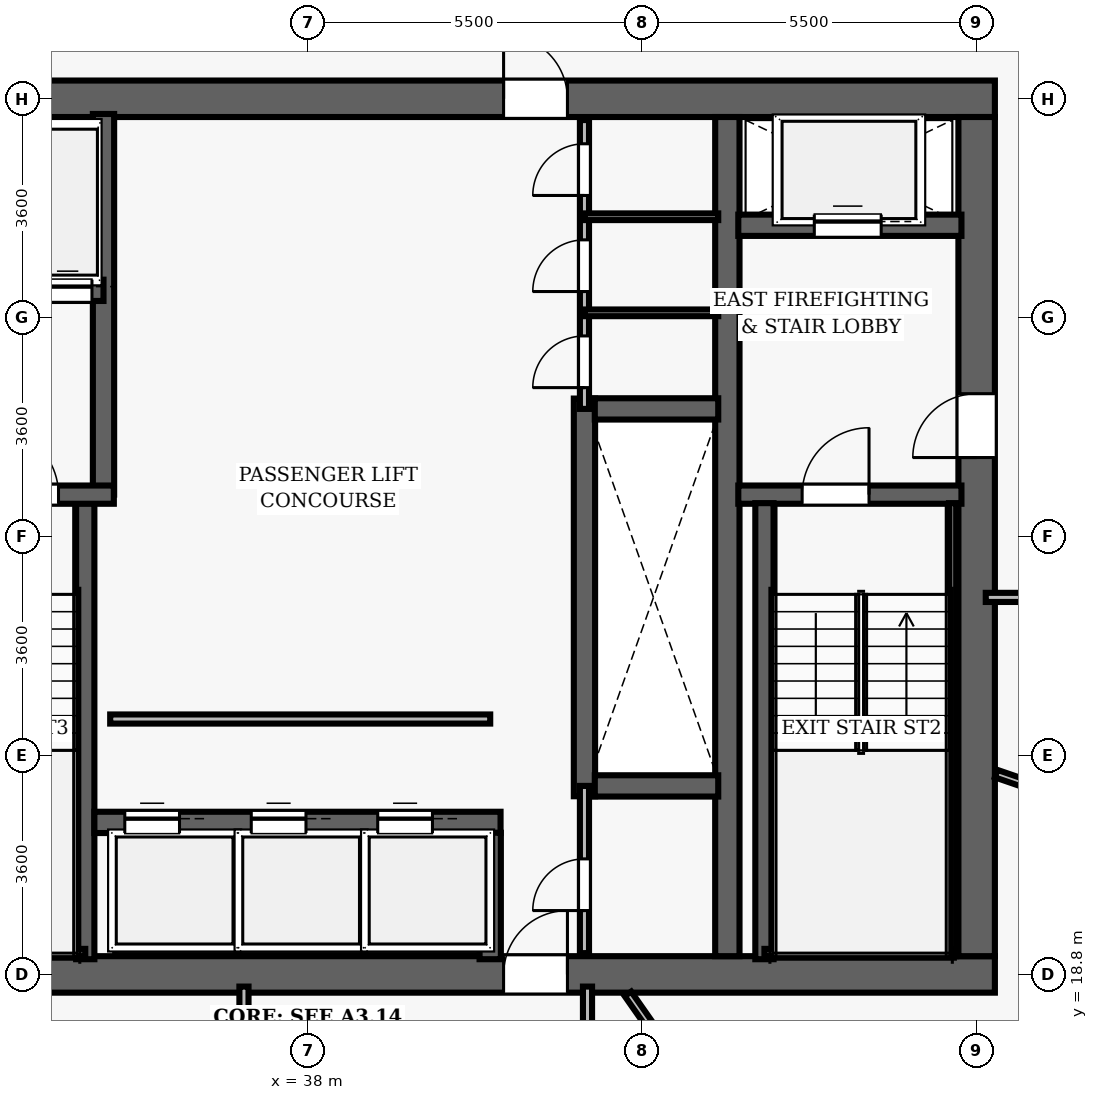
"""IFC4 building model, lengths in metres.
Left out: names, types, materials, properties, quantities, classifications, styles, units other than length and angle.
Written with IfcOpenShell. Run it as: python <this file> out.ifc"""

import sys

from ifc_helpers import new_model, si_unit, direction, frame, frame_2d, origin, place, context, subcontext, project, spatial, rectangle, extrude, element, fill, save


model = new_model("IFC4")
c1 = context("Model", 3, precision=1e-05, world=origin(), true_north=direction((0.0, 1.0)))
c2 = subcontext(c1, "Body", "Model", "MODEL_VIEW")
j1 = project(units=[si_unit("LENGTHUNIT", "METRE"), si_unit("PLANEANGLEUNIT", "RADIAN")], contexts=[c1])
p1 = place(None, origin())
s1 = spatial("IfcSite", under=j1, at=p1, CompositionType="ELEMENT")
p2 = place(p1, origin())
s2 = spatial("IfcBuilding", under=s1, at=p2, CompositionType="ELEMENT")
p3 = place(p2, frame((0.0, 0.0, 162.3)))
s3 = spatial("IfcBuildingStorey", under=s2, at=p3, CompositionType="ELEMENT", Elevation=162.3)
p4 = place(p3, frame((26.7, 18.8, 0.0), z_axis=(0.0, 0.0, 1.0), x_axis=(1.0, 0.0, 0.0)))
e1 = element("IfcWall", 1, at=p4, inside=s3, PredefinedType="SHEAR", context=c2, shape_type="SweptSolid", body=[
    extrude(rectangle(XDim=22.6, YDim=0.6, at=frame_2d((11.3, 0.0))), origin(), (0.0, 0.0, 1.0), 3.5),
])
p5 = place(p4, frame((14.52, 0.0, 0.0)))
e2 = element("IfcOpeningElement", 2, at=p5, cuts=e1, PredefinedType="OPENING", context=c2, shape_type="SweptSolid", body=[
    extrude(rectangle(XDim=1.05, YDim=2.15, at=frame_2d((0.525, 1.075))), frame((0.0, 0.31, 0.0), z_axis=(0.0, -1.0, 0.0), x_axis=(1.0, 0.0, 0.0)), (0.0, 0.0, 1.0), 0.62),
])
p6 = place(p3, frame((26.7, 33.2, 0.0), z_axis=(0.0, 0.0, 1.0), x_axis=(1.0, 0.0, 0.0)))
e3 = element("IfcWall", 3, at=p6, inside=s3, PredefinedType="SHEAR", context=c2, shape_type="SweptSolid", body=[
    extrude(rectangle(XDim=22.6, YDim=0.6, at=frame_2d((11.3, 0.0))), origin(), (0.0, 0.0, 1.0), 3.5),
])
p7 = place(p6, frame((4.62, 0.0, 0.0)))
e4 = element("IfcOpeningElement", 4, at=p7, cuts=e3, PredefinedType="OPENING", context=c2, shape_type="SweptSolid", body=[
    extrude(rectangle(XDim=1.05, YDim=2.15, at=frame_2d((0.525, 1.075))), frame((0.0, 0.31, 0.0), z_axis=(0.0, -1.0, 0.0), x_axis=(1.0, 0.0, 0.0)), (0.0, 0.0, 1.0), 0.62),
])
p8 = place(p6, frame((14.52, 0.0, 0.0)))
e5 = element("IfcOpeningElement", 5, at=p8, cuts=e3, PredefinedType="OPENING", context=c2, shape_type="SweptSolid", body=[
    extrude(rectangle(XDim=1.05, YDim=2.15, at=frame_2d((0.525, 1.075))), frame((0.0, 0.31, 0.0), z_axis=(0.0, -1.0, 0.0), x_axis=(1.0, 0.0, 0.0)), (0.0, 0.0, 1.0), 0.62),
])
p9 = place(p3, frame((49.0, 19.1, 0.0), z_axis=(0.0, 0.0, 1.0), x_axis=(0.0, 1.0, 0.0)))
e6 = element("IfcWall", 6, at=p9, inside=s3, PredefinedType="SHEAR", context=c2, shape_type="SweptSolid", body=[
    extrude(rectangle(XDim=13.8, YDim=0.6, at=frame_2d((6.9, 0.0))), origin(), (0.0, 0.0, 1.0), 3.5),
])
p10 = place(p9, frame((8.2, 0.0, 0.0)))
e7 = element("IfcOpeningElement", 7, at=p10, cuts=e6, PredefinedType="OPENING", context=c2, shape_type="SweptSolid", body=[
    extrude(rectangle(XDim=1.05, YDim=2.15, at=frame_2d((0.525, 1.075))), frame((0.0, 0.31, 0.0), z_axis=(0.0, -1.0, 0.0), x_axis=(1.0, 0.0, 0.0)), (0.0, 0.0, 1.0), 0.62),
])
p11 = place(p3, frame((44.9, 19.1, 0.0), z_axis=(0.0, 0.0, 1.0), x_axis=(0.0, 1.0, 0.0)))
e8 = element("IfcWall", 8, at=p11, inside=s3, PredefinedType="SHEAR", context=c2, shape_type="SweptSolid", body=[
    extrude(rectangle(XDim=13.8, YDim=0.4, at=frame_2d((6.9, 0.0))), origin(), (0.0, 0.0, 1.0), 3.5),
])
p12 = place(p3, frame((45.08, 26.69, 0.0), z_axis=(0.0, 0.0, 1.0), x_axis=(1.0, 0.0, 0.0)))
e9 = element("IfcWall", 9, at=p12, inside=s3, PredefinedType="SHEAR", context=c2, shape_type="SweptSolid", body=[
    extrude(rectangle(XDim=3.67, YDim=0.3, at=frame_2d((1.835, 0.0))), origin(), (0.0, 0.0, 1.0), 3.5),
])
p13 = place(p12, frame((1.05, 0.0, 0.0)))
e10 = element("IfcOpeningElement", 10, at=p13, cuts=e9, PredefinedType="OPENING", context=c2, shape_type="SweptSolid", body=[
    extrude(rectangle(XDim=1.1, YDim=2.15, at=frame_2d((0.55, 1.075))), frame((0.0, 0.16, 0.0), z_axis=(0.0, -1.0, 0.0), x_axis=(1.0, 0.0, 0.0)), (0.0, 0.0, 1.0), 0.32),
])
p14 = place(p3, frame((45.51, 19.05, 0.0), z_axis=(0.0, 0.0, 1.0), x_axis=(0.0, 1.0, 0.0)))
e11 = element("IfcWall", 11, at=p14, inside=s3, PredefinedType="SHEAR", context=c2, shape_type="SweptSolid", body=[
    extrude(rectangle(XDim=7.5, YDim=0.3, at=frame_2d((3.75, 0.0))), origin(), (0.0, 0.0, 1.0), 3.5),
])
p15 = place(p3, frame((48.605, 19.1, 0.0), z_axis=(0.0, 0.0, 1.0), x_axis=(0.0, 1.0, 0.0)))
e12 = element("IfcWall", 12, at=p15, inside=s3, PredefinedType="SHEAR", context=c2, shape_type="SweptSolid", body=[
    extrude(rectangle(XDim=7.45, YDim=0.12, at=frame_2d((3.725, 0.0))), origin(), (0.0, 0.0, 1.0), 3.5),
])
p16 = place(p3, frame((45.51, 19.16, 0.0), z_axis=(0.0, 0.0, 1.0), x_axis=(1.0, 0.0, 0.0)))
e13 = element("IfcWall", 13, at=p16, inside=s3, PredefinedType="SHEAR", context=c2, shape_type="SweptSolid", body=[
    extrude(rectangle(XDim=3.095, YDim=0.12, at=frame_2d((1.547, 0.0))), origin(), (0.0, 0.0, 1.0), 3.5),
])
p17 = place(p3, frame((45.08, 31.12, 0.0), z_axis=(0.0, 0.0, 1.0), x_axis=(1.0, 0.0, 0.0)))
e14 = element("IfcWall", 14, at=p17, inside=s3, PredefinedType="SHEAR", context=c2, shape_type="SweptSolid", body=[
    extrude(rectangle(XDim=3.67, YDim=0.35, at=frame_2d((1.835, 0.0))), origin(), (0.0, 0.0, 1.0), 2.565),
])
p18 = place(p17, frame((1.25, 0.0, 0.0)))
e15 = element("IfcOpeningElement", 15, at=p18, cuts=e14, PredefinedType="OPENING", context=c2, shape_type="SweptSolid", body=[
    extrude(rectangle(XDim=1.1, YDim=2.15, at=frame_2d((0.55, 1.075))), frame((0.0, 0.185, 0.0), z_axis=(0.0, -1.0, 0.0), x_axis=(1.0, 0.0, 0.0)), (0.0, 0.0, 1.0), 0.37),
])
p19 = place(p3, frame((34.34, 19.05, 0.0), z_axis=(0.0, 0.0, 1.0), x_axis=(0.0, 1.0, 0.0)))
e16 = element("IfcWall", 16, at=p19, inside=s3, PredefinedType="SHEAR", context=c2, shape_type="SweptSolid", body=[
    extrude(rectangle(XDim=7.5, YDim=0.3, at=frame_2d((3.75, 0.0))), origin(), (0.0, 0.0, 1.0), 3.5),
])
p20 = place(p3, frame((34.64, 26.69, 0.0), z_axis=(0.0, 0.0, 1.0), x_axis=(0.0, 1.0, 0.0)))
e17 = element("IfcWall", 17, at=p20, inside=s3, PredefinedType="SHEAR", context=c2, shape_type="SweptSolid", body=[
    extrude(rectangle(XDim=6.26, YDim=0.35, at=frame_2d((3.13, 0.0))), origin(), (0.0, 0.0, 1.0), 3.5),
])
p21 = place(p3, frame((31.25, 26.69, 0.0), z_axis=(0.0, 0.0, 1.0), x_axis=(1.0, 0.0, 0.0)))
e18 = element("IfcWall", 18, at=p21, inside=s3, PredefinedType="SHEAR", context=c2, shape_type="SweptSolid", body=[
    extrude(rectangle(XDim=3.56, YDim=0.3, at=frame_2d((1.78, 0.0))), origin(), (0.0, 0.0, 1.0), 3.5),
])
p22 = place(p21, frame((1.55, 0.0, 0.0)))
e19 = element("IfcOpeningElement", 19, at=p22, cuts=e18, PredefinedType="OPENING", context=c2, shape_type="SweptSolid", body=[
    extrude(rectangle(XDim=1.1, YDim=2.15, at=frame_2d((0.55, 1.075))), frame((0.0, 0.16, 0.0), z_axis=(0.0, -1.0, 0.0), x_axis=(1.0, 0.0, 0.0)), (0.0, 0.0, 1.0), 0.32),
])
p23 = place(p3, frame((31.3, 19.16, 0.0), z_axis=(0.0, 0.0, 1.0), x_axis=(1.0, 0.0, 0.0)))
e20 = element("IfcWall", 20, at=p23, inside=s3, PredefinedType="SHEAR", context=c2, shape_type="SweptSolid", body=[
    extrude(rectangle(XDim=3.04, YDim=0.12, at=frame_2d((1.52, 0.0))), origin(), (0.0, 0.0, 1.0), 3.5),
])
p24 = place(p3, frame((32.23, 30.05, 0.0), z_axis=(0.0, 0.0, 1.0), x_axis=(1.0, 0.0, 0.0)))
e21 = element("IfcWall", 21, at=p24, inside=s3, PredefinedType="SHEAR", context=c2, shape_type="SweptSolid", body=[
    extrude(rectangle(XDim=2.41, YDim=0.35, at=frame_2d((1.205, 0.0))), origin(), (0.0, 0.0, 1.0), 2.565),
])
p25 = place(p24, frame((0.42, 0.0, 0.0)))
e22 = element("IfcOpeningElement", 22, at=p25, cuts=e21, PredefinedType="OPENING", context=c2, shape_type="SweptSolid", body=[
    extrude(rectangle(XDim=0.8, YDim=2.15, at=frame_2d((0.4, 1.075))), frame((0.0, 0.185, 0.0), z_axis=(0.0, -1.0, 0.0), x_axis=(1.0, 0.0, 0.0)), (0.0, 0.0, 1.0), 0.37),
])
p26 = place(p24, frame((1.42, 0.0, 0.0)))
e23 = element("IfcOpeningElement", 23, at=p26, cuts=e21, PredefinedType="OPENING", context=c2, shape_type="SweptSolid", body=[
    extrude(rectangle(XDim=0.8, YDim=2.15, at=frame_2d((0.4, 1.075))), frame((0.0, 0.185, 0.0), z_axis=(0.0, -1.0, 0.0), x_axis=(1.0, 0.0, 0.0)), (0.0, 0.0, 1.0), 0.37),
])
p27 = place(p3, frame((42.55, 21.73, 0.0), z_axis=(0.0, 0.0, 1.0), x_axis=(0.0, 1.0, 0.0)))
e24 = element("IfcWall", 24, at=p27, inside=s3, PredefinedType="SHEAR", context=c2, shape_type="SweptSolid", body=[
    extrude(rectangle(XDim=6.54, YDim=0.35, at=frame_2d((3.27, 0.0))), origin(), (0.0, 0.0, 1.0), 2.565),
])
for number, where, z_axis, x_axis in (
    (25, (42.72, 21.9, 0.0), (0.0, 0.0, 1.0), (1.0, 0.0, 0.0)),
    (26, (42.72, 28.1, 0.0), (0.0, 0.0, 1.0), (1.0, 0.0, 0.0)),
):
    element("IfcWall", number, at=place(p3, frame(where, z_axis=z_axis, x_axis=x_axis)), inside=s3, PredefinedType="SHEAR", context=c2, shape_type="SweptSolid", body=[
        extrude(rectangle(XDim=2.03, YDim=0.35, at=frame_2d((1.015, 0.0))), origin(), (0.0, 0.0, 1.0), 2.565),
    ])
p28 = place(p3, frame((34.49, 21.3, 0.0), z_axis=(0.0, 0.0, 1.0), x_axis=(1.0, 0.0, 0.0)))
e27 = element("IfcWall", 27, at=p28, inside=s3, PredefinedType="SHEAR", context=c2, shape_type="SweptSolid", body=[
    extrude(rectangle(XDim=6.68, YDim=0.35, at=frame_2d((3.34, 0.0))), origin(), (0.0, 0.0, 1.0), 2.565),
])
p29 = place(p28, frame((0.5, 0.0, 0.0)))
e28 = element("IfcOpeningElement", 28, at=p29, cuts=e27, PredefinedType="OPENING", context=c2, shape_type="SweptSolid", body=[
    extrude(rectangle(XDim=0.9, YDim=2.15, at=frame_2d((0.45, 1.075))), frame((0.0, 0.185, 0.0), z_axis=(0.0, -1.0, 0.0), x_axis=(1.0, 0.0, 0.0)), (0.0, 0.0, 1.0), 0.37),
])
p30 = place(p28, frame((2.58, 0.0, 0.0)))
e29 = element("IfcOpeningElement", 29, at=p30, cuts=e27, PredefinedType="OPENING", context=c2, shape_type="SweptSolid", body=[
    extrude(rectangle(XDim=0.9, YDim=2.15, at=frame_2d((0.45, 1.075))), frame((0.0, 0.185, 0.0), z_axis=(0.0, -1.0, 0.0), x_axis=(1.0, 0.0, 0.0)), (0.0, 0.0, 1.0), 0.37),
])
p31 = place(p28, frame((4.66, 0.0, 0.0)))
e30 = element("IfcOpeningElement", 30, at=p31, cuts=e27, PredefinedType="OPENING", context=c2, shape_type="SweptSolid", body=[
    extrude(rectangle(XDim=0.9, YDim=2.15, at=frame_2d((0.45, 1.075))), frame((0.0, 0.185, 0.0), z_axis=(0.0, -1.0, 0.0), x_axis=(1.0, 0.0, 0.0)), (0.0, 0.0, 1.0), 0.37),
])
p32 = place(p3, frame((41.0, 19.05, 0.0), z_axis=(0.0, 0.0, 1.0), x_axis=(0.0, 1.0, 0.0)))
e31 = element("IfcWall", 31, at=p32, inside=s3, PredefinedType="SHEAR", context=c2, shape_type="SweptSolid", body=[
    extrude(rectangle(XDim=2.08, YDim=0.35, at=frame_2d((1.04, 0.0))), origin(), (0.0, 0.0, 1.0), 2.565),
])
p33 = place(p3, frame((34.75, 23.0, 0.0), z_axis=(0.0, 0.0, 1.0), x_axis=(1.0, 0.0, 0.0)))
e32 = element("IfcWall", 32, at=p33, inside=s3, PredefinedType="PARTITIONING", context=c2, shape_type="SweptSolid", body=[
    extrude(rectangle(XDim=6.25, YDim=0.15, at=frame_2d((3.125, 0.0))), origin(), (0.0, 0.0, 1.0), 2.565),
])
p34 = place(p3, frame((42.55, 28.1, 0.0), z_axis=(0.0, 0.0, 1.0), x_axis=(0.0, 1.0, 0.0)))
e33 = element("IfcWall", 33, at=p34, inside=s3, PredefinedType="PARTITIONING", context=c2, shape_type="SweptSolid", body=[
    extrude(rectangle(XDim=4.75, YDim=0.15, at=frame_2d((2.375, 0.0))), origin(), (0.0, 0.0, 1.0), 2.565),
])
p35 = place(p34, frame((0.35, 0.0, 0.0)))
e34 = element("IfcOpeningElement", 34, at=p35, cuts=e33, PredefinedType="OPENING", context=c2, shape_type="SweptSolid", body=[
    extrude(rectangle(XDim=0.85, YDim=2.1, at=frame_2d((0.425, 1.05))), frame((0.0, 0.085, 0.0), z_axis=(0.0, -1.0, 0.0), x_axis=(1.0, 0.0, 0.0)), (0.0, 0.0, 1.0), 0.17),
])
p36 = place(p34, frame((1.93, 0.0, 0.0)))
e35 = element("IfcOpeningElement", 35, at=p36, cuts=e33, PredefinedType="OPENING", context=c2, shape_type="SweptSolid", body=[
    extrude(rectangle(XDim=0.85, YDim=2.1, at=frame_2d((0.425, 1.05))), frame((0.0, 0.085, 0.0), z_axis=(0.0, -1.0, 0.0), x_axis=(1.0, 0.0, 0.0)), (0.0, 0.0, 1.0), 0.17),
])
p37 = place(p34, frame((3.51, 0.0, 0.0)))
e36 = element("IfcOpeningElement", 36, at=p37, cuts=e33, PredefinedType="OPENING", context=c2, shape_type="SweptSolid", body=[
    extrude(rectangle(XDim=0.85, YDim=2.1, at=frame_2d((0.425, 1.05))), frame((0.0, 0.085, 0.0), z_axis=(0.0, -1.0, 0.0), x_axis=(1.0, 0.0, 0.0)), (0.0, 0.0, 1.0), 0.17),
])
for number, where, z_axis, x_axis in (
    (37, (42.55, 29.68, 0.0), (0.0, 0.0, 1.0), (1.0, 0.0, 0.0)),
    (38, (42.55, 31.26, 0.0), (0.0, 0.0, 1.0), (1.0, 0.0, 0.0)),
):
    element("IfcWall", number, at=place(p3, frame(where, z_axis=z_axis, x_axis=x_axis)), inside=s3, PredefinedType="PARTITIONING", context=c2, shape_type="SweptSolid", body=[
        extrude(rectangle(XDim=2.2, YDim=0.11, at=frame_2d((1.1, 0.0))), origin(), (0.0, 0.0, 1.0), 2.565),
    ])
p38 = place(p3, frame((42.55, 19.15, 0.0), z_axis=(0.0, 0.0, 1.0), x_axis=(0.0, 1.0, 0.0)))
e39 = element("IfcWall", 39, at=p38, inside=s3, PredefinedType="PARTITIONING", context=c2, shape_type="SweptSolid", body=[
    extrude(rectangle(XDim=2.75, YDim=0.15, at=frame_2d((1.375, 0.0))), origin(), (0.0, 0.0, 1.0), 2.565),
])
p39 = place(p38, frame((0.7, 0.0, 0.0)))
e40 = element("IfcOpeningElement", 40, at=p39, cuts=e39, PredefinedType="OPENING", context=c2, shape_type="SweptSolid", body=[
    extrude(rectangle(XDim=0.85, YDim=2.1, at=frame_2d((0.425, 1.05))), frame((0.0, 0.085, 0.0), z_axis=(0.0, -1.0, 0.0), x_axis=(1.0, 0.0, 0.0)), (0.0, 0.0, 1.0), 0.17),
])
p40 = place(p3, frame((49.15, 25.0, 0.0), z_axis=(0.0, 0.0, 1.0), x_axis=(1.0, 0.0, 0.0)))
e41 = element("IfcWall", 41, at=p40, inside=s3, PredefinedType="PARTITIONING", context=c2, shape_type="SweptSolid", body=[
    extrude(rectangle(XDim=11.661, YDim=0.15, at=frame_2d((5.831, 0.0))), origin(), (0.0, 0.0, 1.0), 2.565),
])
p41 = place(p40, frame((2.44, 0.0, 0.0)))
e42 = element("IfcOpeningElement", 42, at=p41, cuts=e41, PredefinedType="OPENING", context=c2, shape_type="SweptSolid", body=[
    extrude(rectangle(XDim=0.95, YDim=2.15, at=frame_2d((0.475, 1.075))), frame((0.0, 0.085, 0.0), z_axis=(0.0, -1.0, 0.0), x_axis=(1.0, 0.0, 0.0)), (0.0, 0.0, 1.0), 0.17),
])
p42 = place(p3, frame((36.95, 11.2, 0.0), z_axis=(0.0, 0.0, 1.0), x_axis=(0.0, 1.0, 0.0)))
e43 = element("IfcWall", 43, at=p42, inside=s3, PredefinedType="PARTITIONING", context=c2, shape_type="SweptSolid", body=[
    extrude(rectangle(XDim=7.4, YDim=0.15, at=frame_2d((3.7, 0.0))), origin(), (0.0, 0.0, 1.0), 2.565),
])
p43 = place(p42, frame((5.075, 0.0, 0.0)))
e44 = element("IfcOpeningElement", 44, at=p43, cuts=e43, PredefinedType="OPENING", context=c2, shape_type="SweptSolid", body=[
    extrude(rectangle(XDim=0.95, YDim=2.15, at=frame_2d((0.475, 1.075))), frame((0.0, 0.085, 0.0), z_axis=(0.0, -1.0, 0.0), x_axis=(1.0, 0.0, 0.0)), (0.0, 0.0, 1.0), 0.17),
])
p44 = place(p3, frame((42.6, 16.65, 0.0), z_axis=(0.0, 0.0, 1.0), x_axis=(0.0, 1.0, 0.0)))
e45 = element("IfcWall", 45, at=p44, inside=s3, PredefinedType="PARTITIONING", context=c2, shape_type="SweptSolid", body=[
    extrude(rectangle(XDim=1.95, YDim=0.15, at=frame_2d((0.975, 0.0))), origin(), (0.0, 0.0, 1.0), 2.565),
])
p45 = place(p3, frame((43.266, 18.48, 0.0), z_axis=(0.0, 0.0, 1.0), x_axis=(0.57357232701, -0.819154921665, 0.0)))
e46 = element("IfcWall", 46, at=p45, inside=s3, PredefinedType="PARTITIONING", context=c2, shape_type="SweptSolid", body=[
    extrude(rectangle(XDim=17.281, YDim=0.13, at=frame_2d((8.641, 0.0))), origin(), (0.0, 0.0, 1.0), 2.565),
])
p46 = place(p3, frame((49.32, 22.102, 0.0), z_axis=(0.0, 0.0, 1.0), x_axis=(0.945519103615, -0.325566620984, 0.0)))
e47 = element("IfcWall", 47, at=p46, inside=s3, PredefinedType="PARTITIONING", context=c2, shape_type="SweptSolid", body=[
    extrude(rectangle(XDim=15.331, YDim=0.13, at=frame_2d((7.666, 0.0))), origin(), (0.0, 0.0, 1.0), 2.565),
])
p47 = place(p13, origin())
e48 = element("IfcDoor", 48, at=p47, inside=s3, OperationType="SINGLE_SWING_RIGHT", PredefinedType="DOOR", context=c2, shape_type="SweptSolid", body=[
    extrude(rectangle(XDim=1.1, YDim=2.15, at=frame_2d((0.55, 1.075))), frame((0.0, 0.025, 0.0), z_axis=(0.0, -1.0, 0.0), x_axis=(1.0, 0.0, 0.0)), (0.0, 0.0, 1.0), 0.05),
])
fill(e10, e48)
p48 = place(p10, origin())
e49 = element("IfcDoor", 49, at=p48, inside=s3, OperationType="SINGLE_SWING_LEFT", PredefinedType="DOOR", context=c2, shape_type="SweptSolid", body=[
    extrude(rectangle(XDim=1.05, YDim=2.15, at=frame_2d((0.525, 1.075))), frame((0.0, 0.025, 0.0), z_axis=(0.0, -1.0, 0.0), x_axis=(1.0, 0.0, 0.0)), (0.0, 0.0, 1.0), 0.05),
])
fill(e7, e49)
p49 = place(p22, origin())
e50 = element("IfcDoor", 50, at=p49, inside=s3, OperationType="SINGLE_SWING_LEFT", PredefinedType="DOOR", context=c2, shape_type="SweptSolid", body=[
    extrude(rectangle(XDim=1.1, YDim=2.15, at=frame_2d((0.55, 1.075))), frame((0.0, 0.025, 0.0), z_axis=(0.0, -1.0, 0.0), x_axis=(1.0, 0.0, 0.0)), (0.0, 0.0, 1.0), 0.05),
])
fill(e19, e50)
p50 = place(p8, origin())
e51 = element("IfcDoor", 51, at=p50, inside=s3, OperationType="SINGLE_SWING_LEFT", PredefinedType="DOOR", context=c2, shape_type="SweptSolid", body=[
    extrude(rectangle(XDim=1.05, YDim=2.15, at=frame_2d((0.525, 1.075))), frame((0.0, 0.025, 0.0), z_axis=(0.0, -1.0, 0.0), x_axis=(1.0, 0.0, 0.0)), (0.0, 0.0, 1.0), 0.05),
])
fill(e5, e51)
p51 = place(p5, origin())
e52 = element("IfcDoor", 52, at=p51, inside=s3, OperationType="SINGLE_SWING_RIGHT", PredefinedType="DOOR", context=c2, shape_type="SweptSolid", body=[
    extrude(rectangle(XDim=1.05, YDim=2.15, at=frame_2d((0.525, 1.075))), frame((0.0, 0.025, 0.0), z_axis=(0.0, -1.0, 0.0), x_axis=(1.0, 0.0, 0.0)), (0.0, 0.0, 1.0), 0.05),
])
fill(e2, e52)
p52 = place(p35, origin())
e53 = element("IfcDoor", 53, at=p52, inside=s3, OperationType="SINGLE_SWING_LEFT", PredefinedType="DOOR", context=c2, shape_type="SweptSolid", body=[
    extrude(rectangle(XDim=0.85, YDim=2.1, at=frame_2d((0.425, 1.05))), frame((0.0, 0.025, 0.0), z_axis=(0.0, -1.0, 0.0), x_axis=(1.0, 0.0, 0.0)), (0.0, 0.0, 1.0), 0.05),
])
fill(e34, e53)
p53 = place(p36, origin())
e54 = element("IfcDoor", 54, at=p53, inside=s3, OperationType="SINGLE_SWING_LEFT", PredefinedType="DOOR", context=c2, shape_type="SweptSolid", body=[
    extrude(rectangle(XDim=0.85, YDim=2.1, at=frame_2d((0.425, 1.05))), frame((0.0, 0.025, 0.0), z_axis=(0.0, -1.0, 0.0), x_axis=(1.0, 0.0, 0.0)), (0.0, 0.0, 1.0), 0.05),
])
fill(e35, e54)
p54 = place(p37, origin())
e55 = element("IfcDoor", 55, at=p54, inside=s3, OperationType="SINGLE_SWING_LEFT", PredefinedType="DOOR", context=c2, shape_type="SweptSolid", body=[
    extrude(rectangle(XDim=0.85, YDim=2.1, at=frame_2d((0.425, 1.05))), frame((0.0, 0.025, 0.0), z_axis=(0.0, -1.0, 0.0), x_axis=(1.0, 0.0, 0.0)), (0.0, 0.0, 1.0), 0.05),
])
fill(e36, e55)
p55 = place(p39, origin())
e56 = element("IfcDoor", 56, at=p55, inside=s3, OperationType="SINGLE_SWING_LEFT", PredefinedType="DOOR", context=c2, shape_type="SweptSolid", body=[
    extrude(rectangle(XDim=0.85, YDim=2.1, at=frame_2d((0.425, 1.05))), frame((0.0, 0.025, 0.0), z_axis=(0.0, -1.0, 0.0), x_axis=(1.0, 0.0, 0.0)), (0.0, 0.0, 1.0), 0.05),
])
fill(e40, e56)
p56 = place(p29, origin())
e57 = element("IfcDoor", 57, at=p56, inside=s3, OperationType="SLIDING_TO_LEFT", PredefinedType="DOOR", context=c2, shape_type="SweptSolid", body=[
    extrude(rectangle(XDim=0.9, YDim=2.15, at=frame_2d((0.45, 1.075))), frame((0.0, 0.025, 0.0), z_axis=(0.0, -1.0, 0.0), x_axis=(1.0, 0.0, 0.0)), (0.0, 0.0, 1.0), 0.05),
])
fill(e28, e57)
p57 = place(p30, origin())
e58 = element("IfcDoor", 58, at=p57, inside=s3, OperationType="SLIDING_TO_LEFT", PredefinedType="DOOR", context=c2, shape_type="SweptSolid", body=[
    extrude(rectangle(XDim=0.9, YDim=2.15, at=frame_2d((0.45, 1.075))), frame((0.0, 0.025, 0.0), z_axis=(0.0, -1.0, 0.0), x_axis=(1.0, 0.0, 0.0)), (0.0, 0.0, 1.0), 0.05),
])
fill(e29, e58)
p58 = place(p31, origin())
e59 = element("IfcDoor", 59, at=p58, inside=s3, OperationType="SLIDING_TO_LEFT", PredefinedType="DOOR", context=c2, shape_type="SweptSolid", body=[
    extrude(rectangle(XDim=0.9, YDim=2.15, at=frame_2d((0.45, 1.075))), frame((0.0, 0.025, 0.0), z_axis=(0.0, -1.0, 0.0), x_axis=(1.0, 0.0, 0.0)), (0.0, 0.0, 1.0), 0.05),
])
fill(e30, e59)
p59 = place(p18, origin())
e60 = element("IfcDoor", 60, at=p59, inside=s3, OperationType="SLIDING_TO_LEFT", PredefinedType="DOOR", context=c2, shape_type="SweptSolid", body=[
    extrude(rectangle(XDim=1.1, YDim=2.15, at=frame_2d((0.55, 1.075))), frame((0.0, 0.025, 0.0), z_axis=(0.0, -1.0, 0.0), x_axis=(1.0, 0.0, 0.0)), (0.0, 0.0, 1.0), 0.05),
])
fill(e15, e60)
p60 = place(p26, origin())
e61 = element("IfcDoor", 61, at=p60, inside=s3, OperationType="SLIDING_TO_LEFT", PredefinedType="DOOR", context=c2, shape_type="SweptSolid", body=[
    extrude(rectangle(XDim=0.8, YDim=2.15, at=frame_2d((0.4, 1.075))), frame((0.0, 0.025, 0.0), z_axis=(0.0, -1.0, 0.0), x_axis=(1.0, 0.0, 0.0)), (0.0, 0.0, 1.0), 0.05),
])
fill(e23, e61)
save(model, sys.argv[1])
